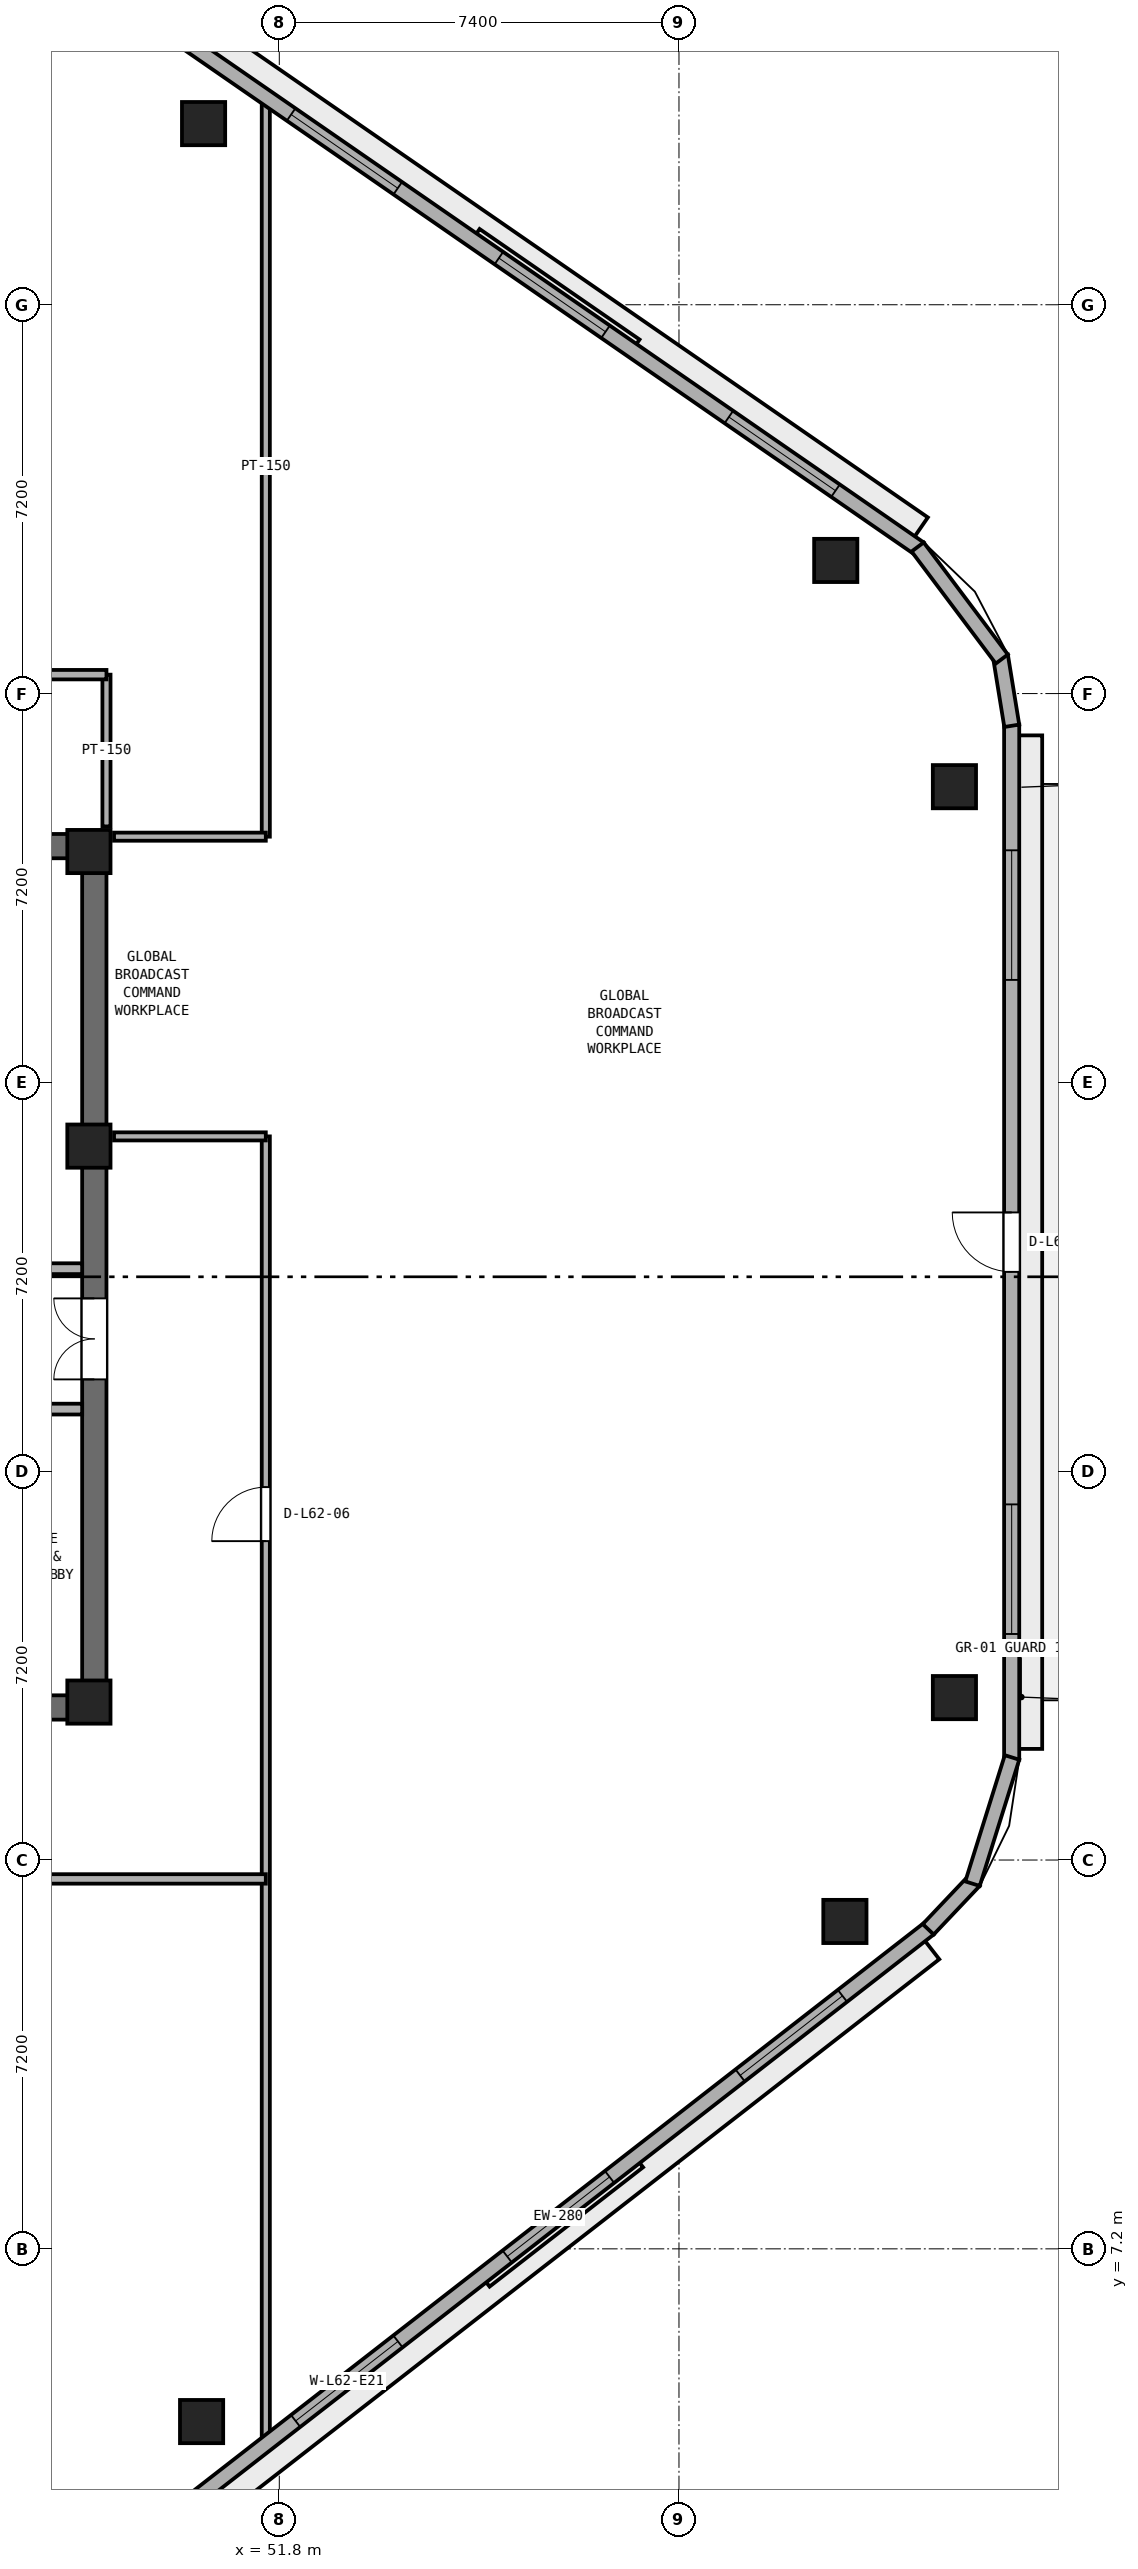
"""IFC4 building model, lengths in metres.
Left out: names, types, materials, properties, quantities, classifications, styles, units other than length and angle.
Written with IfcOpenShell. Run it as: python <this file> out.ifc"""

import sys

from ifc_helpers import new_model, si_unit, direction, frame, frame_2d, origin, origin_2d, place, context, subcontext, project, spatial, rectangle, extrude, element, fill, save


model = new_model("IFC4")
c1 = context("Model", 3, precision=1e-05, world=origin(), true_north=direction((0.0, 1.0)))
c2 = subcontext(c1, "Body", "Model", "MODEL_VIEW")
j1 = project(units=[si_unit("LENGTHUNIT", "METRE"), si_unit("PLANEANGLEUNIT", "RADIAN")], contexts=[c1])
p1 = place(None, origin())
s1 = spatial("IfcSite", under=j1, at=p1, CompositionType="ELEMENT")
p2 = place(p1, origin())
s2 = spatial("IfcBuilding", under=s1, at=p2, CompositionType="ELEMENT")
p3 = place(p2, frame((0.0, 0.0, 244.0)))
s3 = spatial("IfcBuildingStorey", under=s2, at=p3, CompositionType="ELEMENT", Elevation=244.0)
for number, where, z_axis, x_axis in (
    (1, (25.4, 17.225, 0.0), (0.0, 0.0, 1.0), (1.0, 0.0, 0.0)),
    (2, (25.4, 33.175, 0.0), (0.0, 0.0, 1.0), (1.0, 0.0, 0.0)),
):
    element("IfcWall", number, at=place(p3, frame(where, z_axis=z_axis, x_axis=x_axis)), inside=s3, PredefinedType="SHEAR", context=c2, shape_type="SweptSolid", body=[
        extrude(rectangle(XDim=23.2, YDim=0.45, at=frame_2d((11.6, 0.0))), origin(), (0.0, 0.0, 1.0), 3.51),
    ])
p4 = place(p3, frame((48.375, 17.45, 0.0), z_axis=(0.0, 0.0, 1.0), x_axis=(0.0, 1.0, 0.0)))
e3 = element("IfcWall", 3, at=p4, inside=s3, PredefinedType="SHEAR", context=c2, shape_type="SweptSolid", body=[
    extrude(rectangle(XDim=15.5, YDim=0.45, at=frame_2d((7.75, 0.0))), origin(), (0.0, 0.0, 1.0), 3.51),
])
p5 = place(p4, frame((5.85, 0.0, 0.0)))
e4 = element("IfcOpeningElement", 4, at=p5, cuts=e3, PredefinedType="OPENING", context=c2, shape_type="SweptSolid", body=[
    extrude(rectangle(XDim=1.5, YDim=2.15, at=frame_2d((0.75, 1.075))), frame((0.0, 0.235, 0.0), z_axis=(0.0, -1.0, 0.0), x_axis=(1.0, 0.0, 0.0)), (0.0, 0.0, 1.0), 0.47),
])
for number, where, z_axis, x_axis in (
    (5, (48.275, 17.325, 0.0), (0.0, 0.0, 1.0), (1.0, 0.0, 0.0)),
    (6, (48.275, 27.62, 0.0), (0.0, 0.0, 1.0), (1.0, 0.0, 0.0)),
    (7, (48.275, 33.075, 0.0), (0.0, 0.0, 1.0), (1.0, 0.0, 0.0)),
):
    element("IfcColumn", number, at=place(p3, frame(where, z_axis=z_axis, x_axis=x_axis)), inside=s3, PredefinedType="PILASTER", context=c2, shape_type="SweptSolid", body=[
        extrude(rectangle(XDim=0.8, YDim=0.8, at=origin_2d()), origin(), (0.0, 0.0, 1.0), 3.8),
    ])
for number, where, z_axis, x_axis in (
    (8, (50.361, 4.002, 0.0), (0.0, 0.0, 1.0), (1.0, 0.0, 0.0)),
    (9, (62.272, 13.262, 0.0), (0.0, 0.0, 1.0), (1.0, 0.0, 0.0)),
    (10, (64.3, 17.408, 0.0), (0.0, 0.0, 1.0), (1.0, 0.0, 0.0)),
    (11, (64.3, 34.276, 0.0), (0.0, 0.0, 1.0), (1.0, 0.0, 0.0)),
    (12, (62.103, 38.465, 0.0), (0.0, 0.0, 1.0), (1.0, 0.0, 0.0)),
    (13, (50.398, 46.554, 0.0), (0.0, 0.0, 1.0), (1.0, 0.0, 0.0)),
):
    element("IfcColumn", number, at=place(p3, frame(where, z_axis=z_axis, x_axis=x_axis)), inside=s3, PredefinedType="COLUMN", context=c2, shape_type="SweptSolid", body=[
        extrude(rectangle(XDim=0.8, YDim=0.8, at=origin_2d()), origin(), (0.0, 0.0, 1.0), 3.8),
    ])
p6 = place(p3, frame((42.0, 22.75, 0.0), z_axis=(0.0, 0.0, 1.0), x_axis=(1.0, 0.0, 0.0)))
e14 = element("IfcWall", 14, at=p6, inside=s3, PredefinedType="SOLIDWALL", context=c2, shape_type="SweptSolid", body=[
    extrude(rectangle(XDim=6.15, YDim=0.2, at=frame_2d((3.075, 0.0))), origin(), (0.0, 0.0, 1.0), 3.51),
])
p7 = place(p3, frame((46.1, 25.35, 0.0), z_axis=(0.0, 0.0, 1.0), x_axis=(1.0, 0.0, 0.0)))
e15 = element("IfcWall", 15, at=p7, inside=s3, PredefinedType="SOLIDWALL", context=c2, shape_type="SweptSolid", body=[
    extrude(rectangle(XDim=2.05, YDim=0.2, at=frame_2d((1.025, 0.0))), origin(), (0.0, 0.0, 1.0), 3.51),
])
p8 = place(p3, frame((51.55, 3.546, 0.0), z_axis=(0.0, 0.0, 1.0), x_axis=(0.0, 1.0, 0.0)))
e16 = element("IfcWall", 16, at=p8, inside=s3, PredefinedType="PARTITIONING", context=c2, shape_type="SweptSolid", body=[
    extrude(rectangle(XDim=24.254, YDim=0.15, at=frame_2d((12.127, 0.0))), origin(), (0.0, 0.0, 1.0), 3.51),
])
p9 = place(p8, frame((16.759, 0.0, 0.0)))
e17 = element("IfcOpeningElement", 17, at=p9, cuts=e16, PredefinedType="OPENING", context=c2, shape_type="SweptSolid", body=[
    extrude(rectangle(XDim=1.0, YDim=2.12, at=frame_2d((0.5, 1.06))), frame((0.0, 0.085, 0.0), z_axis=(0.0, -1.0, 0.0), x_axis=(1.0, 0.0, 0.0)), (0.0, 0.0, 1.0), 0.17),
])
p10 = place(p3, frame((51.55, 33.35, 0.0), z_axis=(0.0, 0.0, 1.0), x_axis=(0.0, 1.0, 0.0)))
e18 = element("IfcWall", 18, at=p10, inside=s3, PredefinedType="PARTITIONING", context=c2, shape_type="SweptSolid", body=[
    extrude(rectangle(XDim=13.727, YDim=0.15, at=frame_2d((6.863, 0.0))), origin(), (0.0, 0.0, 1.0), 3.51),
])
p11 = place(p3, frame((48.6, 33.54, 0.0), z_axis=(0.0, 0.0, 1.0), x_axis=(0.0, 1.0, 0.0)))
e19 = element("IfcWall", 19, at=p11, inside=s3, PredefinedType="PARTITIONING", context=c2, shape_type="SweptSolid", body=[
    extrude(rectangle(XDim=2.81, YDim=0.15, at=frame_2d((1.405, 0.0))), origin(), (0.0, 0.0, 1.0), 2.893),
])
p12 = place(p3, frame((38.35, 14.05, 0.0), z_axis=(0.0, 0.0, 1.0), x_axis=(1.0, 0.0, 0.0)))
e20 = element("IfcWall", 20, at=p12, inside=s3, PredefinedType="PARTITIONING", context=c2, shape_type="SweptSolid", body=[
    extrude(rectangle(XDim=13.2, YDim=0.175, at=frame_2d((6.6, 0.0))), origin(), (0.0, 0.0, 1.0), 3.51),
])
p13 = place(p12, frame((6.15, 0.0, 0.0)))
e21 = element("IfcOpeningElement", 21, at=p13, cuts=e20, PredefinedType="OPENING", context=c2, shape_type="SweptSolid", body=[
    extrude(rectangle(XDim=0.9, YDim=2.1, at=frame_2d((0.45, 1.05))), frame((0.0, 0.097, 0.0), z_axis=(0.0, -1.0, 0.0), x_axis=(1.0, 0.0, 0.0)), (0.0, 0.0, 1.0), 0.195),
])
p14 = place(p3, frame((48.74, 27.8, 0.0), z_axis=(0.0, 0.0, 1.0), x_axis=(1.0, 0.0, 0.0)))
e22 = element("IfcWall", 22, at=p14, inside=s3, PredefinedType="PARTITIONING", context=c2, shape_type="SweptSolid", body=[
    extrude(rectangle(XDim=2.81, YDim=0.15, at=frame_2d((1.405, 0.0))), origin(), (0.0, 0.0, 1.0), 3.51),
])
p15 = place(p3, frame((48.74, 33.35, 0.0), z_axis=(0.0, 0.0, 1.0), x_axis=(1.0, 0.0, 0.0)))
e23 = element("IfcWall", 23, at=p15, inside=s3, PredefinedType="PARTITIONING", context=c2, shape_type="SweptSolid", body=[
    extrude(rectangle(XDim=2.81, YDim=0.15, at=frame_2d((1.405, 0.0))), origin(), (0.0, 0.0, 1.0), 2.893),
])
p16 = place(p3, frame((22.45, 36.35, 0.0), z_axis=(0.0, 0.0, 1.0), x_axis=(1.0, 0.0, 0.0)))
e24 = element("IfcWall", 24, at=p16, inside=s3, PredefinedType="PARTITIONING", context=c2, shape_type="SweptSolid", body=[
    extrude(rectangle(XDim=26.15, YDim=0.175, at=frame_2d((13.075, 0.0))), origin(), (0.0, 0.0, 1.0), 3.51),
])
p17 = place(p16, frame((12.575, 0.0, 0.0)))
e25 = element("IfcOpeningElement", 25, at=p17, cuts=e24, PredefinedType="OPENING", context=c2, shape_type="SweptSolid", body=[
    extrude(rectangle(XDim=1.0, YDim=2.12, at=frame_2d((0.5, 1.06))), frame((0.0, 0.097, 0.0), z_axis=(0.0, -1.0, 0.0), x_axis=(1.0, 0.0, 0.0)), (0.0, 0.0, 1.0), 0.195),
])
p18 = place(p3, frame((50.104, 2.459, 0.0), z_axis=(0.0, 0.0, 1.0), x_axis=(0.789464857485, 0.613795763097, 0.0)))
e26 = element("IfcWall", 26, at=p18, inside=s3, PredefinedType="STANDARD", context=c2, shape_type="SweptSolid", body=[
    extrude(rectangle(XDim=17.387, YDim=0.28, at=frame_2d((8.694, 0.0))), origin(), (0.0, 0.0, 1.0), 3.51),
])
p19 = place(p18, frame((2.531, 0.0, 0.9)))
e27 = element("IfcOpeningElement", 27, at=p19, cuts=e26, PredefinedType="OPENING", context=c2, shape_type="SweptSolid", body=[
    extrude(rectangle(XDim=2.4, YDim=1.75, at=frame_2d((1.2, 0.875))), frame((0.0, 0.15, 0.0), z_axis=(0.0, -1.0, 0.0), x_axis=(1.0, 0.0, 0.0)), (0.0, 0.0, 1.0), 0.3),
])
p20 = place(p18, frame((7.494, 0.0, 0.9)))
e28 = element("IfcOpeningElement", 28, at=p20, cuts=e26, PredefinedType="OPENING", context=c2, shape_type="SweptSolid", body=[
    extrude(rectangle(XDim=2.4, YDim=1.75, at=frame_2d((1.2, 0.875))), frame((0.0, 0.15, 0.0), z_axis=(0.0, -1.0, 0.0), x_axis=(1.0, 0.0, 0.0)), (0.0, 0.0, 1.0), 0.3),
])
p21 = place(p18, frame((12.956, 0.0, 0.9)))
e29 = element("IfcOpeningElement", 29, at=p21, cuts=e26, PredefinedType="OPENING", context=c2, shape_type="SweptSolid", body=[
    extrude(rectangle(XDim=2.4, YDim=1.75, at=frame_2d((1.2, 0.875))), frame((0.0, 0.15, 0.0), z_axis=(0.0, -1.0, 0.0), x_axis=(1.0, 0.0, 0.0)), (0.0, 0.0, 1.0), 0.3),
])
p22 = place(p3, frame((65.36, 16.258, 0.0), z_axis=(0.0, 0.0, 1.0), x_axis=(0.0, 1.0, 0.0)))
e30 = element("IfcWall", 30, at=p22, inside=s3, PredefinedType="STANDARD", context=c2, shape_type="SweptSolid", body=[
    extrude(rectangle(XDim=19.168, YDim=0.28, at=frame_2d((9.584, 0.0))), origin(), (0.0, 0.0, 1.0), 3.51),
])
p23 = place(p22, frame((9.034, 0.0, 0.0)))
e31 = element("IfcOpeningElement", 31, at=p23, cuts=e30, PredefinedType="OPENING", context=c2, shape_type="SweptSolid", body=[
    extrude(rectangle(XDim=1.1, YDim=2.2, at=frame_2d((0.55, 1.1))), frame((0.0, 0.15, 0.0), z_axis=(0.0, -1.0, 0.0), x_axis=(1.0, 0.0, 0.0)), (0.0, 0.0, 1.0), 0.3),
])
p24 = place(p22, frame((2.328, 0.0, 0.9)))
e32 = element("IfcOpeningElement", 32, at=p24, cuts=e30, PredefinedType="OPENING", context=c2, shape_type="SweptSolid", body=[
    extrude(rectangle(XDim=2.4, YDim=1.75, at=frame_2d((1.2, 0.875))), frame((0.0, 0.15, 0.0), z_axis=(0.0, -1.0, 0.0), x_axis=(1.0, 0.0, 0.0)), (0.0, 0.0, 1.0), 0.3),
])
p25 = place(p22, frame((14.44, 0.0, 0.9)))
e33 = element("IfcOpeningElement", 33, at=p25, cuts=e30, PredefinedType="OPENING", context=c2, shape_type="SweptSolid", body=[
    extrude(rectangle(XDim=2.4, YDim=1.75, at=frame_2d((1.2, 0.875))), frame((0.0, 0.15, 0.0), z_axis=(0.0, -1.0, 0.0), x_axis=(1.0, 0.0, 0.0)), (0.0, 0.0, 1.0), 0.3),
])
p26 = place(p3, frame((63.651, 38.683, 0.0), z_axis=(0.0, 0.0, 1.0), x_axis=(-0.822655095, 0.568540759022, 0.0)))
e34 = element("IfcWall", 34, at=p26, inside=s3, PredefinedType="STANDARD", context=c2, shape_type="SweptSolid", body=[
    extrude(rectangle(XDim=16.528, YDim=0.28, at=frame_2d((8.264, 0.0))), origin(), (0.0, 0.0, 1.0), 3.51),
])
p27 = place(p26, frame((1.888, 0.0, 0.9)))
e35 = element("IfcOpeningElement", 35, at=p27, cuts=e34, PredefinedType="OPENING", context=c2, shape_type="SweptSolid", body=[
    extrude(rectangle(XDim=2.4, YDim=1.75, at=frame_2d((1.2, 0.875))), frame((0.0, 0.15, 0.0), z_axis=(0.0, -1.0, 0.0), x_axis=(1.0, 0.0, 0.0)), (0.0, 0.0, 1.0), 0.3),
])
p28 = place(p26, frame((7.064, 0.0, 0.9)))
e36 = element("IfcOpeningElement", 36, at=p28, cuts=e34, PredefinedType="OPENING", context=c2, shape_type="SweptSolid", body=[
    extrude(rectangle(XDim=2.4, YDim=1.75, at=frame_2d((1.2, 0.875))), frame((0.0, 0.15, 0.0), z_axis=(0.0, -1.0, 0.0), x_axis=(1.0, 0.0, 0.0)), (0.0, 0.0, 1.0), 0.3),
])
p29 = place(p26, frame((11.74, 0.0, 0.9)))
e37 = element("IfcOpeningElement", 37, at=p29, cuts=e34, PredefinedType="OPENING", context=c2, shape_type="SweptSolid", body=[
    extrude(rectangle(XDim=2.4, YDim=1.75, at=frame_2d((1.2, 0.875))), frame((0.0, 0.15, 0.0), z_axis=(0.0, -1.0, 0.0), x_axis=(1.0, 0.0, 0.0)), (0.0, 0.0, 1.0), 0.3),
])
p30 = place(p3, frame((63.815, 13.117, 0.0), z_axis=(0.0, 0.0, 1.0), x_axis=(0.687733716128, 0.725963040176, 0.0)))
e38 = element("IfcWall", 38, at=p30, inside=s3, PredefinedType="STANDARD", context=c2, shape_type="SweptSolid", body=[
    extrude(rectangle(XDim=1.239, YDim=0.28, at=frame_2d((0.62, 0.0))), origin(), (0.0, 0.0, 1.0), 3.51),
])
p31 = place(p3, frame((64.635, 13.962, 0.0), z_axis=(0.0, 0.0, 1.0), x_axis=(0.298649578722, 0.954362839348, 0.0)))
e39 = element("IfcWall", 39, at=p31, inside=s3, PredefinedType="STANDARD", context=c2, shape_type="SweptSolid", body=[
    extrude(rectangle(XDim=2.449, YDim=0.28, at=frame_2d((1.225, 0.0))), origin(), (0.0, 0.0, 1.0), 3.51),
])
p32 = place(p3, frame((65.362, 35.403, 0.0), z_axis=(0.0, 0.0, 1.0), x_axis=(-0.160271674114, 0.987072940809, 0.0)))
e40 = element("IfcWall", 40, at=p32, inside=s3, PredefinedType="STANDARD", context=c2, shape_type="SweptSolid", body=[
    extrude(rectangle(XDim=1.315, YDim=0.28, at=frame_2d((0.657, 0.0))), origin(), (0.0, 0.0, 1.0), 3.51),
])
p33 = place(p3, frame((65.177, 36.639, 0.0), z_axis=(0.0, 0.0, 1.0), x_axis=(-0.600436386467, 0.799672524104, 0.0)))
e41 = element("IfcWall", 41, at=p33, inside=s3, PredefinedType="STANDARD", context=c2, shape_type="SweptSolid", body=[
    extrude(rectangle(XDim=2.595, YDim=0.28, at=frame_2d((1.298, 0.0))), origin(), (0.0, 0.0, 1.0), 3.51),
])
p34 = place(p5, origin())
e42 = element("IfcDoor", 42, at=p34, inside=s3, OperationType="DOUBLE_DOOR_SINGLE_SWING", PredefinedType="DOOR", context=c2, shape_type="SweptSolid", body=[
    extrude(rectangle(XDim=1.5, YDim=2.15, at=frame_2d((0.75, 1.075))), frame((0.0, 0.025, 0.0), z_axis=(0.0, -1.0, 0.0), x_axis=(1.0, 0.0, 0.0)), (0.0, 0.0, 1.0), 0.05),
])
fill(e4, e42)
p35 = place(p9, origin())
e43 = element("IfcDoor", 43, at=p35, inside=s3, OperationType="SINGLE_SWING_LEFT", PredefinedType="DOOR", context=c2, shape_type="SweptSolid", body=[
    extrude(rectangle(XDim=1.0, YDim=2.12, at=frame_2d((0.5, 1.06))), frame((0.0, 0.025, 0.0), z_axis=(0.0, -1.0, 0.0), x_axis=(1.0, 0.0, 0.0)), (0.0, 0.0, 1.0), 0.05),
])
fill(e17, e43)
p36 = place(p19, origin())
e44 = element("IfcWindow", 44, at=p36, inside=s3, PartitioningType="SINGLE_PANEL", PredefinedType="WINDOW", context=c2, shape_type="SweptSolid", body=[
    extrude(rectangle(XDim=2.4, YDim=1.75, at=frame_2d((1.2, 0.875))), frame((0.0, 0.03, 0.0), z_axis=(0.0, -1.0, 0.0), x_axis=(1.0, 0.0, 0.0)), (0.0, 0.0, 1.0), 0.06),
])
fill(e27, e44)
p37 = place(p20, origin())
e45 = element("IfcWindow", 45, at=p37, inside=s3, PartitioningType="SINGLE_PANEL", PredefinedType="WINDOW", context=c2, shape_type="SweptSolid", body=[
    extrude(rectangle(XDim=2.4, YDim=1.75, at=frame_2d((1.2, 0.875))), frame((0.0, 0.03, 0.0), z_axis=(0.0, -1.0, 0.0), x_axis=(1.0, 0.0, 0.0)), (0.0, 0.0, 1.0), 0.06),
])
fill(e28, e45)
p38 = place(p21, origin())
e46 = element("IfcWindow", 46, at=p38, inside=s3, PartitioningType="SINGLE_PANEL", PredefinedType="WINDOW", context=c2, shape_type="SweptSolid", body=[
    extrude(rectangle(XDim=2.4, YDim=1.75, at=frame_2d((1.2, 0.875))), frame((0.0, 0.03, 0.0), z_axis=(0.0, -1.0, 0.0), x_axis=(1.0, 0.0, 0.0)), (0.0, 0.0, 1.0), 0.06),
])
fill(e29, e46)
p39 = place(p23, origin())
e47 = element("IfcDoor", 47, at=p39, inside=s3, OperationType="SINGLE_SWING_RIGHT", PredefinedType="DOOR", context=c2, shape_type="SweptSolid", body=[
    extrude(rectangle(XDim=1.1, YDim=2.2, at=frame_2d((0.55, 1.1))), frame((0.0, 0.025, 0.0), z_axis=(0.0, -1.0, 0.0), x_axis=(1.0, 0.0, 0.0)), (0.0, 0.0, 1.0), 0.05),
])
fill(e31, e47)
p40 = place(p24, origin())
e48 = element("IfcWindow", 48, at=p40, inside=s3, PartitioningType="SINGLE_PANEL", PredefinedType="WINDOW", context=c2, shape_type="SweptSolid", body=[
    extrude(rectangle(XDim=2.4, YDim=1.75, at=frame_2d((1.2, 0.875))), frame((0.0, 0.03, 0.0), z_axis=(0.0, -1.0, 0.0), x_axis=(1.0, 0.0, 0.0)), (0.0, 0.0, 1.0), 0.06),
])
fill(e32, e48)
p41 = place(p25, origin())
e49 = element("IfcWindow", 49, at=p41, inside=s3, PartitioningType="SINGLE_PANEL", PredefinedType="WINDOW", context=c2, shape_type="SweptSolid", body=[
    extrude(rectangle(XDim=2.4, YDim=1.75, at=frame_2d((1.2, 0.875))), frame((0.0, 0.03, 0.0), z_axis=(0.0, -1.0, 0.0), x_axis=(1.0, 0.0, 0.0)), (0.0, 0.0, 1.0), 0.06),
])
fill(e33, e49)
p42 = place(p27, origin())
e50 = element("IfcWindow", 50, at=p42, inside=s3, PartitioningType="SINGLE_PANEL", PredefinedType="WINDOW", context=c2, shape_type="SweptSolid", body=[
    extrude(rectangle(XDim=2.4, YDim=1.75, at=frame_2d((1.2, 0.875))), frame((0.0, 0.03, 0.0), z_axis=(0.0, -1.0, 0.0), x_axis=(1.0, 0.0, 0.0)), (0.0, 0.0, 1.0), 0.06),
])
fill(e35, e50)
p43 = place(p28, origin())
e51 = element("IfcWindow", 51, at=p43, inside=s3, PartitioningType="SINGLE_PANEL", PredefinedType="WINDOW", context=c2, shape_type="SweptSolid", body=[
    extrude(rectangle(XDim=2.4, YDim=1.75, at=frame_2d((1.2, 0.875))), frame((0.0, 0.03, 0.0), z_axis=(0.0, -1.0, 0.0), x_axis=(1.0, 0.0, 0.0)), (0.0, 0.0, 1.0), 0.06),
])
fill(e36, e51)
p44 = place(p29, origin())
e52 = element("IfcWindow", 52, at=p44, inside=s3, PartitioningType="SINGLE_PANEL", PredefinedType="WINDOW", context=c2, shape_type="SweptSolid", body=[
    extrude(rectangle(XDim=2.4, YDim=1.75, at=frame_2d((1.2, 0.875))), frame((0.0, 0.03, 0.0), z_axis=(0.0, -1.0, 0.0), x_axis=(1.0, 0.0, 0.0)), (0.0, 0.0, 1.0), 0.06),
])
fill(e37, e52)
save(model, sys.argv[1])
